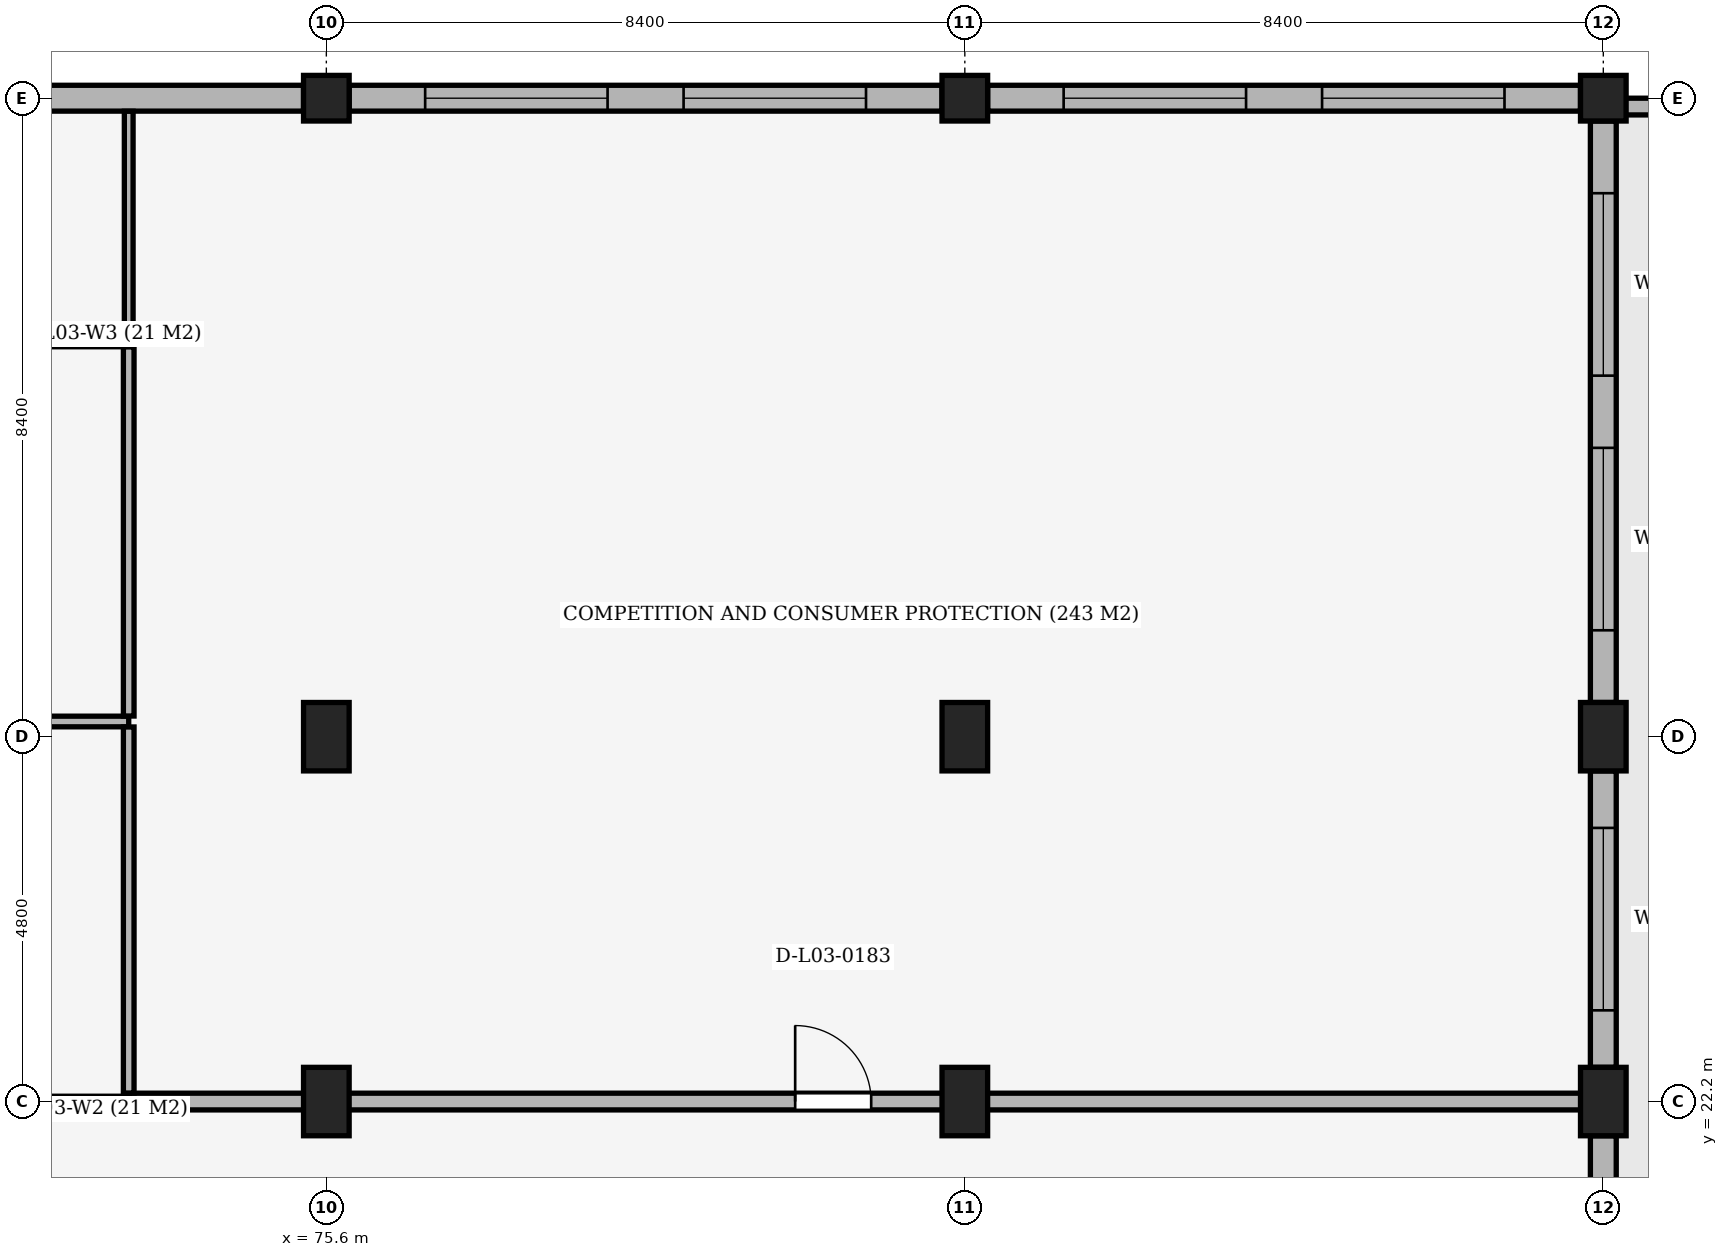
"""IFC4 building model, lengths in metres.
Left out: names, types, materials, properties, quantities, classifications, styles, units other than length and angle.
Written with IfcOpenShell. Run it as: python <this file> out.ifc"""

import sys

from ifc_helpers import new_model, si_unit, direction, frame, frame_2d, origin, origin_2d, place, context, subcontext, project, spatial, rectangle, extrude, element, fill, save


model = new_model("IFC4")
c1 = context("Model", 3, precision=1e-05, world=origin(), true_north=direction((0.0, 1.0)))
c2 = subcontext(c1, "Body", "Model", "MODEL_VIEW")
j1 = project(units=[si_unit("LENGTHUNIT", "METRE"), si_unit("PLANEANGLEUNIT", "RADIAN")], contexts=[c1])
p1 = place(None, origin())
s1 = spatial("IfcSite", under=j1, at=p1, CompositionType="ELEMENT")
p2 = place(p1, origin())
s2 = spatial("IfcBuilding", under=s1, at=p2, CompositionType="ELEMENT")
p3 = place(p2, frame((0.0, 0.0, 15.3)))
s3 = spatial("IfcBuildingStorey", under=s2, at=p3, CompositionType="ELEMENT", Elevation=15.3)
for number, where, z_axis, x_axis in (
    (1, (75.6, 22.2, 0.0), (0.0, 0.0, 1.0), (1.0, 0.0, 0.0)),
    (2, (75.6, 27.0, 0.0), (0.0, 0.0, 1.0), (1.0, 0.0, 0.0)),
):
    element("IfcColumn", number, at=place(p3, frame(where, z_axis=z_axis, x_axis=x_axis)), inside=s3, PredefinedType="COLUMN", context=c2, shape_type="SweptSolid", body=[
        extrude(rectangle(XDim=0.6, YDim=0.9, at=origin_2d()), origin(), (0.0, 0.0, 1.0), 5.1),
    ])
p4 = place(p3, frame((75.6, 35.4, 0.0), z_axis=(0.0, 0.0, 1.0), x_axis=(1.0, 0.0, 0.0)))
e3 = element("IfcColumn", 3, at=p4, inside=s3, PredefinedType="COLUMN", context=c2, shape_type="SweptSolid", body=[
    extrude(rectangle(XDim=0.6, YDim=0.6, at=origin_2d()), origin(), (0.0, 0.0, 1.0), 5.1),
])
for number, where, z_axis, x_axis in (
    (4, (84.0, 22.2, 0.0), (0.0, 0.0, 1.0), (1.0, 0.0, 0.0)),
    (5, (84.0, 27.0, 0.0), (0.0, 0.0, 1.0), (1.0, 0.0, 0.0)),
):
    element("IfcColumn", number, at=place(p3, frame(where, z_axis=z_axis, x_axis=x_axis)), inside=s3, PredefinedType="COLUMN", context=c2, shape_type="SweptSolid", body=[
        extrude(rectangle(XDim=0.6, YDim=0.9, at=origin_2d()), origin(), (0.0, 0.0, 1.0), 5.1),
    ])
p5 = place(p3, frame((84.0, 35.4, 0.0), z_axis=(0.0, 0.0, 1.0), x_axis=(1.0, 0.0, 0.0)))
e6 = element("IfcColumn", 6, at=p5, inside=s3, PredefinedType="COLUMN", context=c2, shape_type="SweptSolid", body=[
    extrude(rectangle(XDim=0.6, YDim=0.6, at=origin_2d()), origin(), (0.0, 0.0, 1.0), 5.1),
])
for number, where, z_axis, x_axis in (
    (7, (92.4, 22.2, 0.0), (0.0, 0.0, 1.0), (1.0, 0.0, 0.0)),
    (8, (92.4, 27.0, 0.0), (0.0, 0.0, 1.0), (1.0, 0.0, 0.0)),
):
    element("IfcColumn", number, at=place(p3, frame(where, z_axis=z_axis, x_axis=x_axis)), inside=s3, PredefinedType="COLUMN", context=c2, shape_type="SweptSolid", body=[
        extrude(rectangle(XDim=0.6, YDim=0.9, at=origin_2d()), origin(), (0.0, 0.0, 1.0), 5.1),
    ])
p6 = place(p3, frame((92.4, 35.4, 0.0), z_axis=(0.0, 0.0, 1.0), x_axis=(1.0, 0.0, 0.0)))
e9 = element("IfcColumn", 9, at=p6, inside=s3, PredefinedType="COLUMN", context=c2, shape_type="SweptSolid", body=[
    extrude(rectangle(XDim=0.6, YDim=0.6, at=origin_2d()), origin(), (0.0, 0.0, 1.0), 5.1),
])
p7 = place(p3, frame((67.5, 35.4, 0.0), z_axis=(0.0, 0.0, 1.0), x_axis=(1.0, 0.0, 0.0)))
e10 = element("IfcWall", 10, at=p7, inside=s3, PredefinedType="SOLIDWALL", context=c2, shape_type="SweptSolid", body=[
    extrude(rectangle(XDim=7.8, YDim=0.34, at=frame_2d((3.9, 0.0))), origin(), (0.0, 0.0, 1.0), 4.14),
])
p8 = place(p7, frame((1.0, 0.0, 0.85)))
e11 = element("IfcOpeningElement", 11, at=p8, cuts=e10, PredefinedType="OPENING", context=c2, shape_type="SweptSolid", body=[
    extrude(rectangle(XDim=2.4, YDim=2.4, at=frame_2d((1.2, 1.2))), frame((0.0, 0.185, 0.0), z_axis=(0.0, -1.0, 0.0), x_axis=(1.0, 0.0, 0.0)), (0.0, 0.0, 1.0), 0.37),
])
p9 = place(p3, frame((75.9, 35.4, 0.0), z_axis=(0.0, 0.0, 1.0), x_axis=(1.0, 0.0, 0.0)))
e12 = element("IfcWall", 12, at=p9, inside=s3, PredefinedType="SOLIDWALL", context=c2, shape_type="SweptSolid", body=[
    extrude(rectangle(XDim=7.8, YDim=0.34, at=frame_2d((3.9, 0.0))), origin(), (0.0, 0.0, 1.0), 4.14),
])
p10 = place(p9, frame((1.0, 0.0, 0.85)))
e13 = element("IfcOpeningElement", 13, at=p10, cuts=e12, PredefinedType="OPENING", context=c2, shape_type="SweptSolid", body=[
    extrude(rectangle(XDim=2.4, YDim=2.4, at=frame_2d((1.2, 1.2))), frame((0.0, 0.185, 0.0), z_axis=(0.0, -1.0, 0.0), x_axis=(1.0, 0.0, 0.0)), (0.0, 0.0, 1.0), 0.37),
])
p11 = place(p9, frame((4.4, 0.0, 0.85)))
e14 = element("IfcOpeningElement", 14, at=p11, cuts=e12, PredefinedType="OPENING", context=c2, shape_type="SweptSolid", body=[
    extrude(rectangle(XDim=2.4, YDim=2.4, at=frame_2d((1.2, 1.2))), frame((0.0, 0.185, 0.0), z_axis=(0.0, -1.0, 0.0), x_axis=(1.0, 0.0, 0.0)), (0.0, 0.0, 1.0), 0.37),
])
p12 = place(p3, frame((84.3, 35.4, 0.0), z_axis=(0.0, 0.0, 1.0), x_axis=(1.0, 0.0, 0.0)))
e15 = element("IfcWall", 15, at=p12, inside=s3, PredefinedType="SOLIDWALL", context=c2, shape_type="SweptSolid", body=[
    extrude(rectangle(XDim=7.8, YDim=0.34, at=frame_2d((3.9, 0.0))), origin(), (0.0, 0.0, 1.0), 4.14),
])
p13 = place(p12, frame((1.0, 0.0, 0.85)))
e16 = element("IfcOpeningElement", 16, at=p13, cuts=e15, PredefinedType="OPENING", context=c2, shape_type="SweptSolid", body=[
    extrude(rectangle(XDim=2.4, YDim=2.4, at=frame_2d((1.2, 1.2))), frame((0.0, 0.185, 0.0), z_axis=(0.0, -1.0, 0.0), x_axis=(1.0, 0.0, 0.0)), (0.0, 0.0, 1.0), 0.37),
])
p14 = place(p12, frame((4.4, 0.0, 0.85)))
e17 = element("IfcOpeningElement", 17, at=p14, cuts=e15, PredefinedType="OPENING", context=c2, shape_type="SweptSolid", body=[
    extrude(rectangle(XDim=2.4, YDim=2.4, at=frame_2d((1.2, 1.2))), frame((0.0, 0.185, 0.0), z_axis=(0.0, -1.0, 0.0), x_axis=(1.0, 0.0, 0.0)), (0.0, 0.0, 1.0), 0.37),
])
p15 = place(p3, frame((92.4, 35.1, 0.0), z_axis=(0.0, 0.0, 1.0), x_axis=(0.0, -1.0, 0.0)))
e18 = element("IfcWall", 18, at=p15, inside=s3, PredefinedType="SOLIDWALL", context=c2, shape_type="SweptSolid", body=[
    extrude(rectangle(XDim=7.65, YDim=0.34, at=frame_2d((3.825, 0.0))), origin(), (0.0, 0.0, 1.0), 4.14),
])
p16 = place(p15, frame((0.95, 0.0, 0.85)))
e19 = element("IfcOpeningElement", 19, at=p16, cuts=e18, PredefinedType="OPENING", context=c2, shape_type="SweptSolid", body=[
    extrude(rectangle(XDim=2.4, YDim=2.4, at=frame_2d((1.2, 1.2))), frame((0.0, 0.185, 0.0), z_axis=(0.0, -1.0, 0.0), x_axis=(1.0, 0.0, 0.0)), (0.0, 0.0, 1.0), 0.37),
])
p17 = place(p15, frame((4.3, 0.0, 0.85)))
e20 = element("IfcOpeningElement", 20, at=p17, cuts=e18, PredefinedType="OPENING", context=c2, shape_type="SweptSolid", body=[
    extrude(rectangle(XDim=2.4, YDim=2.4, at=frame_2d((1.2, 1.2))), frame((0.0, 0.185, 0.0), z_axis=(0.0, -1.0, 0.0), x_axis=(1.0, 0.0, 0.0)), (0.0, 0.0, 1.0), 0.37),
])
p18 = place(p3, frame((92.4, 26.55, 0.0), z_axis=(0.0, 0.0, 1.0), x_axis=(0.0, -1.0, 0.0)))
e21 = element("IfcWall", 21, at=p18, inside=s3, PredefinedType="SOLIDWALL", context=c2, shape_type="SweptSolid", body=[
    extrude(rectangle(XDim=3.9, YDim=0.34, at=frame_2d((1.95, 0.0))), origin(), (0.0, 0.0, 1.0), 4.29),
])
p19 = place(p18, frame((0.75, 0.0, 0.85)))
e22 = element("IfcOpeningElement", 22, at=p19, cuts=e21, PredefinedType="OPENING", context=c2, shape_type="SweptSolid", body=[
    extrude(rectangle(XDim=2.4, YDim=2.4, at=frame_2d((1.2, 1.2))), frame((0.0, 0.185, 0.0), z_axis=(0.0, -1.0, 0.0), x_axis=(1.0, 0.0, 0.0)), (0.0, 0.0, 1.0), 0.37),
])
p20 = place(p3, frame((92.4, 21.75, 0.0), z_axis=(0.0, 0.0, 1.0), x_axis=(0.0, -1.0, 0.0)))
e23 = element("IfcWall", 23, at=p20, inside=s3, PredefinedType="SOLIDWALL", context=c2, shape_type="SweptSolid", body=[
    extrude(rectangle(XDim=15.9, YDim=0.34, at=frame_2d((7.95, 0.0))), origin(), (0.0, 0.0, 1.0), 3.79),
])
p21 = place(p20, frame((3.7, 0.0, 0.85)))
e24 = element("IfcOpeningElement", 24, at=p21, cuts=e23, PredefinedType="OPENING", context=c2, shape_type="SweptSolid", body=[
    extrude(rectangle(XDim=2.4, YDim=2.4, at=frame_2d((1.2, 1.2))), frame((0.0, 0.185, 0.0), z_axis=(0.0, -1.0, 0.0), x_axis=(1.0, 0.0, 0.0)), (0.0, 0.0, 1.0), 0.37),
])
p22 = place(p20, frame((9.8, 0.0, 0.85)))
e25 = element("IfcOpeningElement", 25, at=p22, cuts=e23, PredefinedType="OPENING", context=c2, shape_type="SweptSolid", body=[
    extrude(rectangle(XDim=2.4, YDim=2.4, at=frame_2d((1.2, 1.2))), frame((0.0, 0.185, 0.0), z_axis=(0.0, -1.0, 0.0), x_axis=(1.0, 0.0, 0.0)), (0.0, 0.0, 1.0), 0.37),
])
p23 = place(p3, frame((108.95, 35.29, 0.0), z_axis=(0.0, 0.0, 1.0), x_axis=(-1.0, 0.0, 0.0)))
e26 = element("IfcWall", 26, at=p23, inside=s3, PredefinedType="PARAPET", context=c2, shape_type="SweptSolid", body=[
    extrude(rectangle(XDim=16.3, YDim=0.22, at=frame_2d((8.15, 0.0))), origin(), (0.0, 0.0, 1.0), 1.15),
])
p24 = place(p3, frame((68.8, 22.2, 0.0), z_axis=(0.0, 0.0, 1.0), x_axis=(1.0, 0.0, 0.0)))
e27 = element("IfcWall", 27, at=p24, inside=s3, PredefinedType="PARTITIONING", context=c2, shape_type="SweptSolid", body=[
    extrude(rectangle(XDim=4.2, YDim=0.14, at=frame_2d((2.1, 0.0))), origin(), (0.0, 0.0, 1.0), 4.14),
])
p25 = place(p3, frame((73.0, 22.2, 0.0), z_axis=(0.0, 0.0, 1.0), x_axis=(1.0, 0.0, 0.0)))
e28 = element("IfcWall", 28, at=p25, inside=s3, PredefinedType="PARTITIONING", context=c2, shape_type="SweptSolid", body=[
    extrude(rectangle(XDim=19.437, YDim=0.22, at=frame_2d((9.719, 0.0))), origin(), (0.0, 0.0, 1.0), 4.14),
])
p26 = place(p25, frame((8.768, 0.0, 0.0)))
e29 = element("IfcOpeningElement", 29, at=p26, cuts=e28, PredefinedType="OPENING", context=c2, shape_type="SweptSolid", body=[
    extrude(rectangle(XDim=1.0, YDim=2.2, at=frame_2d((0.5, 1.1))), frame((0.0, 0.125, 0.0), z_axis=(0.0, -1.0, 0.0), x_axis=(1.0, 0.0, 0.0)), (0.0, 0.0, 1.0), 0.25),
])
p27 = place(p3, frame((68.8, 27.2, 0.0), z_axis=(0.0, 0.0, 1.0), x_axis=(1.0, 0.0, 0.0)))
e30 = element("IfcWall", 30, at=p27, inside=s3, PredefinedType="PARTITIONING", context=c2, shape_type="SweptSolid", body=[
    extrude(rectangle(XDim=4.2, YDim=0.14, at=frame_2d((2.1, 0.0))), origin(), (0.0, 0.0, 1.0), 4.14),
])
p28 = place(p3, frame((68.8, 32.2, 0.0), z_axis=(0.0, 0.0, 1.0), x_axis=(1.0, 0.0, 0.0)))
e31 = element("IfcWall", 31, at=p28, inside=s3, PredefinedType="PARTITIONING", context=c2, shape_type="SweptSolid", body=[
    extrude(rectangle(XDim=4.2, YDim=0.14, at=frame_2d((2.1, 0.0))), origin(), (0.0, 0.0, 1.0), 4.84),
])
p29 = place(p3, frame((73.0, 22.312, 0.0), z_axis=(0.0, 0.0, 1.0), x_axis=(0.0, 1.0, 0.0)))
e32 = element("IfcWall", 32, at=p29, inside=s3, PredefinedType="PARTITIONING", context=c2, shape_type="SweptSolid", body=[
    extrude(rectangle(XDim=4.816, YDim=0.14, at=frame_2d((2.408, 0.0))), origin(), (0.0, 0.0, 1.0), 4.14),
])
p30 = place(p3, frame((73.0, 27.272, 0.0), z_axis=(0.0, 0.0, 1.0), x_axis=(0.0, 1.0, 0.0)))
e33 = element("IfcWall", 33, at=p30, inside=s3, PredefinedType="PARTITIONING", context=c2, shape_type="SweptSolid", body=[
    extrude(rectangle(XDim=4.856, YDim=0.14, at=frame_2d((2.428, 0.0))), origin(), (0.0, 0.0, 1.0), 4.14),
])
p31 = place(p3, frame((73.0, 32.272, 0.0), z_axis=(0.0, 0.0, 1.0), x_axis=(0.0, 1.0, 0.0)))
e34 = element("IfcWall", 34, at=p31, inside=s3, PredefinedType="PARTITIONING", context=c2, shape_type="SweptSolid", body=[
    extrude(rectangle(XDim=2.956, YDim=0.115, at=frame_2d((1.478, 0.0))), origin(), (0.0, 0.0, 1.0), 4.14),
])
p32 = place(p10, origin())
e35 = element("IfcWindow", 35, at=p32, inside=s3, PartitioningType="SINGLE_PANEL", PredefinedType="WINDOW", context=c2, shape_type="SweptSolid", body=[
    extrude(rectangle(XDim=2.4, YDim=2.4, at=frame_2d((1.2, 1.2))), frame((0.0, 0.03, 0.0), z_axis=(0.0, -1.0, 0.0), x_axis=(1.0, 0.0, 0.0)), (0.0, 0.0, 1.0), 0.06),
])
fill(e13, e35)
p33 = place(p11, origin())
e36 = element("IfcWindow", 36, at=p33, inside=s3, PartitioningType="SINGLE_PANEL", PredefinedType="WINDOW", context=c2, shape_type="SweptSolid", body=[
    extrude(rectangle(XDim=2.4, YDim=2.4, at=frame_2d((1.2, 1.2))), frame((0.0, 0.03, 0.0), z_axis=(0.0, -1.0, 0.0), x_axis=(1.0, 0.0, 0.0)), (0.0, 0.0, 1.0), 0.06),
])
fill(e14, e36)
p34 = place(p13, origin())
e37 = element("IfcWindow", 37, at=p34, inside=s3, PartitioningType="SINGLE_PANEL", PredefinedType="WINDOW", context=c2, shape_type="SweptSolid", body=[
    extrude(rectangle(XDim=2.4, YDim=2.4, at=frame_2d((1.2, 1.2))), frame((0.0, 0.03, 0.0), z_axis=(0.0, -1.0, 0.0), x_axis=(1.0, 0.0, 0.0)), (0.0, 0.0, 1.0), 0.06),
])
fill(e16, e37)
p35 = place(p14, origin())
e38 = element("IfcWindow", 38, at=p35, inside=s3, PartitioningType="SINGLE_PANEL", PredefinedType="WINDOW", context=c2, shape_type="SweptSolid", body=[
    extrude(rectangle(XDim=2.4, YDim=2.4, at=frame_2d((1.2, 1.2))), frame((0.0, 0.03, 0.0), z_axis=(0.0, -1.0, 0.0), x_axis=(1.0, 0.0, 0.0)), (0.0, 0.0, 1.0), 0.06),
])
fill(e17, e38)
p36 = place(p16, origin())
e39 = element("IfcWindow", 39, at=p36, inside=s3, PartitioningType="SINGLE_PANEL", PredefinedType="WINDOW", context=c2, shape_type="SweptSolid", body=[
    extrude(rectangle(XDim=2.4, YDim=2.4, at=frame_2d((1.2, 1.2))), frame((0.0, 0.03, 0.0), z_axis=(0.0, -1.0, 0.0), x_axis=(1.0, 0.0, 0.0)), (0.0, 0.0, 1.0), 0.06),
])
fill(e19, e39)
p37 = place(p17, origin())
e40 = element("IfcWindow", 40, at=p37, inside=s3, PartitioningType="SINGLE_PANEL", PredefinedType="WINDOW", context=c2, shape_type="SweptSolid", body=[
    extrude(rectangle(XDim=2.4, YDim=2.4, at=frame_2d((1.2, 1.2))), frame((0.0, 0.03, 0.0), z_axis=(0.0, -1.0, 0.0), x_axis=(1.0, 0.0, 0.0)), (0.0, 0.0, 1.0), 0.06),
])
fill(e20, e40)
p38 = place(p19, origin())
e41 = element("IfcWindow", 41, at=p38, inside=s3, PartitioningType="SINGLE_PANEL", PredefinedType="WINDOW", context=c2, shape_type="SweptSolid", body=[
    extrude(rectangle(XDim=2.4, YDim=2.4, at=frame_2d((1.2, 1.2))), frame((0.0, 0.03, 0.0), z_axis=(0.0, -1.0, 0.0), x_axis=(1.0, 0.0, 0.0)), (0.0, 0.0, 1.0), 0.06),
])
fill(e22, e41)
p39 = place(p26, origin())
e42 = element("IfcDoor", 42, at=p39, inside=s3, OperationType="SINGLE_SWING_LEFT", PredefinedType="DOOR", context=c2, shape_type="SweptSolid", body=[
    extrude(rectangle(XDim=1.0, YDim=2.2, at=frame_2d((0.5, 1.1))), frame((0.0, 0.025, 0.0), z_axis=(0.0, -1.0, 0.0), x_axis=(1.0, 0.0, 0.0)), (0.0, 0.0, 1.0), 0.05),
])
fill(e29, e42)
save(model, sys.argv[1])
